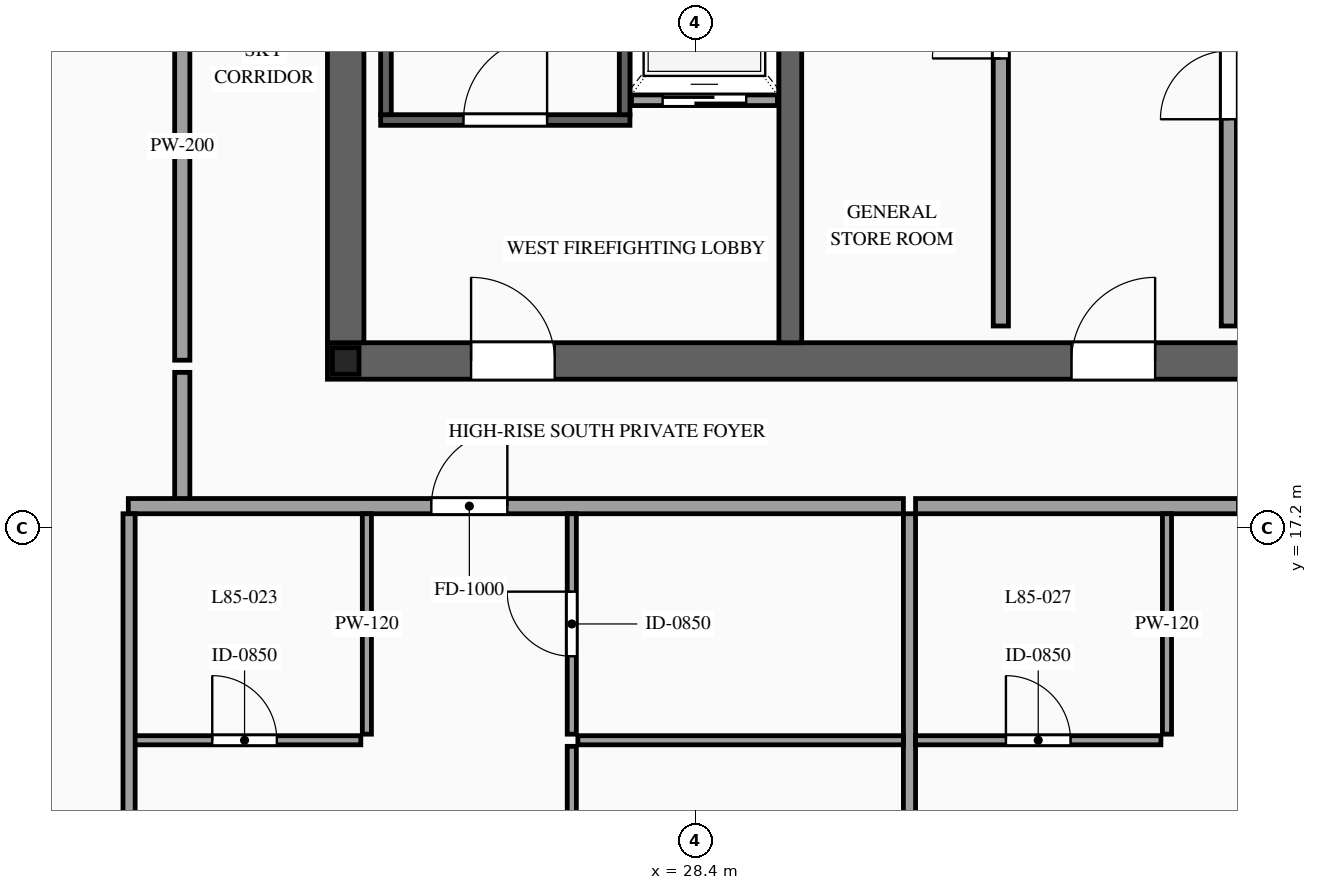
"""IFC4 building model, lengths in metres.
Left out: names, types, materials, properties, quantities, classifications, styles, units other than length and angle.
Written with IfcOpenShell. Run it as: python <this file> out.ifc"""

import sys

from ifc_helpers import new_model, si_unit, direction, frame, frame_2d, origin, origin_2d, place, context, subcontext, project, spatial, rectangle, i_section, extrude, source, transform, mapped, element, fill, save


model = new_model("IFC4")
c1 = context("Model", 3, precision=1e-05, world=origin(), true_north=direction((0.0, 1.0)))
c2 = subcontext(c1, "Body", "Model", "MODEL_VIEW")
j1 = project(units=[si_unit("LENGTHUNIT", "METRE"), si_unit("PLANEANGLEUNIT", "RADIAN")], contexts=[c1])
p1 = place(None, origin())
s1 = spatial("IfcSite", under=j1, at=p1, CompositionType="ELEMENT")
p2 = place(p1, origin())
s2 = spatial("IfcBuilding", under=s1, at=p2, CompositionType="ELEMENT")
p3 = place(p2, frame((0.0, 0.0, 318.2)))
s3 = spatial("IfcBuildingStorey", under=s2, at=p3, CompositionType="ELEMENT", Elevation=318.2)
p4 = place(p3, frame((23.56, 19.4, 0.0), z_axis=(0.0, 0.0, 1.0), x_axis=(1.0, 0.0, 0.0)))
e1 = element("IfcWall", 1, at=p4, inside=s3, PredefinedType="SHEAR", context=c2, shape_type="SweptSolid", body=[
    extrude(rectangle(XDim=26.88, YDim=0.48, at=frame_2d((13.44, 0.0))), origin(), (0.0, 0.0, 1.0), 3.5),
])
p5 = place(p4, frame((1.89, 0.0, 0.0)))
e2 = element("IfcOpeningElement", 2, at=p5, cuts=e1, PredefinedType="OPENING", context=c2, shape_type="SweptSolid", body=[
    extrude(rectangle(XDim=1.1, YDim=2.2, at=frame_2d((0.55, 1.1))), frame((0.0, 0.255, 0.0), z_axis=(0.0, -1.0, 0.0), x_axis=(1.0, 0.0, 0.0)), (0.0, 0.0, 1.0), 0.51),
])
p6 = place(p4, frame((9.79, 0.0, 0.0)))
e3 = element("IfcOpeningElement", 3, at=p6, cuts=e1, PredefinedType="OPENING", context=c2, shape_type="SweptSolid", body=[
    extrude(rectangle(XDim=1.1, YDim=2.2, at=frame_2d((0.55, 1.1))), frame((0.0, 0.255, 0.0), z_axis=(0.0, -1.0, 0.0), x_axis=(1.0, 0.0, 0.0)), (0.0, 0.0, 1.0), 0.51),
])
p7 = place(p4, frame((22.99, 0.0, 0.0)))
e4 = element("IfcOpeningElement", 4, at=p7, cuts=e1, PredefinedType="OPENING", context=c2, shape_type="SweptSolid", body=[
    extrude(rectangle(XDim=1.1, YDim=2.2, at=frame_2d((0.55, 1.1))), frame((0.0, 0.255, 0.0), z_axis=(0.0, -1.0, 0.0), x_axis=(1.0, 0.0, 0.0)), (0.0, 0.0, 1.0), 0.51),
])
p8 = place(p4, frame((19.61, 0.0, 0.0)))
e5 = element("IfcOpeningElement", 5, at=p8, cuts=e1, PredefinedType="OPENING", context=c2, shape_type="SweptSolid", body=[
    extrude(rectangle(XDim=0.9, YDim=2.15, at=frame_2d((0.45, 1.075))), frame((0.0, 0.255, 0.0), z_axis=(0.0, -1.0, 0.0), x_axis=(1.0, 0.0, 0.0)), (0.0, 0.0, 1.0), 0.51),
])
p9 = place(p4, frame((18.17, 0.0, 0.0)))
e6 = element("IfcOpeningElement", 6, at=p9, cuts=e1, PredefinedType="OPENING", context=c2, shape_type="SweptSolid", body=[
    extrude(rectangle(XDim=0.9, YDim=2.15, at=frame_2d((0.45, 1.075))), frame((0.0, 0.255, 0.0), z_axis=(0.0, -1.0, 0.0), x_axis=(1.0, 0.0, 0.0)), (0.0, 0.0, 1.0), 0.51),
])
m1 = source(origin(), c2, "Body", "SweptSolid", [
    extrude(rectangle(XDim=12.32, YDim=0.48, at=frame_2d((6.16, 0.0))), origin(), (0.0, 0.0, 1.0), 3.5),
])
p10 = place(p3, frame((23.8, 19.64, 0.0), z_axis=(0.0, 0.0, 1.0), x_axis=(0.0, 1.0, 0.0)))
e7 = element("IfcWall", 7, at=p10, inside=s3, PredefinedType="SHEAR", context=c2, shape_type="MappedRepresentation", body=[
    mapped(m1, transform((0.0, 0.0, 0.0), scale=1.0)),
])
m2 = source(origin(), c2, "Body", "SweptSolid", [
    extrude(rectangle(XDim=12.32, YDim=0.3, at=frame_2d((6.16, 0.0))), origin(), (0.0, 0.0, 1.0), 3.5),
])
p11 = place(p3, frame((29.65, 19.64, 0.0), z_axis=(0.0, 0.0, 1.0), x_axis=(0.0, 1.0, 0.0)))
e8 = element("IfcWall", 8, at=p11, inside=s3, PredefinedType="SOLIDWALL", context=c2, shape_type="MappedRepresentation", body=[
    mapped(m2, transform((0.0, 0.0, 0.0), scale=1.0)),
])
m3 = source(origin(), c2, "Body", "SweptSolid", [
    extrude(i_section(OverallWidth=0.35, OverallDepth=0.35, WebThickness=0.012, FlangeThickness=0.019, at=origin_2d()), origin(), (0.0, 0.0, 1.0), 3.5),
])
p12 = place(p3, frame((23.8, 19.4, 0.0), z_axis=(0.0, 0.0, 1.0), x_axis=(1.0, 0.0, 0.0)))
e9 = element("IfcColumn", 9, at=p12, inside=s3, PredefinedType="COLUMN", context=c2, shape_type="MappedRepresentation", body=[
    mapped(m3, transform((0.0, 0.0, 0.0), scale=1.0)),
])
p13 = place(p3, frame((27.56, 22.83, 0.0), z_axis=(0.0, 0.0, 1.0), x_axis=(1.0, 0.0, 0.0)))
e10 = element("IfcWall", 10, at=p13, inside=s3, PredefinedType="SOLIDWALL", context=c2, shape_type="SweptSolid", body=[
    extrude(rectangle(XDim=1.92, YDim=0.14, at=frame_2d((0.96, 0.0))), origin(), (0.0, 0.0, 1.0), 3.28),
])
p14 = place(p13, frame((0.41, 0.0, 0.0)))
e11 = element("IfcOpeningElement", 11, at=p14, cuts=e10, PredefinedType="OPENING", context=c2, shape_type="SweptSolid", body=[
    extrude(rectangle(XDim=1.1, YDim=2.2, at=frame_2d((0.55, 1.1))), frame((0.0, 0.085, 0.0), z_axis=(0.0, -1.0, 0.0), x_axis=(1.0, 0.0, 0.0)), (0.0, 0.0, 1.0), 0.17),
])
p15 = place(p3, frame((24.26, 22.57, 0.0), z_axis=(0.0, 0.0, 1.0), x_axis=(1.0, 0.0, 0.0)))
e12 = element("IfcWall", 12, at=p15, inside=s3, PredefinedType="SOLIDWALL", context=c2, shape_type="SweptSolid", body=[
    extrude(rectangle(XDim=3.28, YDim=0.14, at=frame_2d((1.64, 0.0))), origin(), (0.0, 0.0, 1.0), 3.28),
])
p16 = place(p15, frame((1.09, 0.0, 0.0)))
e13 = element("IfcOpeningElement", 13, at=p16, cuts=e12, PredefinedType="OPENING", context=c2, shape_type="SweptSolid", body=[
    extrude(rectangle(XDim=1.1, YDim=2.2, at=frame_2d((0.55, 1.1))), frame((0.0, 0.085, 0.0), z_axis=(0.0, -1.0, 0.0), x_axis=(1.0, 0.0, 0.0)), (0.0, 0.0, 1.0), 0.17),
])
m4 = source(origin(), c2, "Body", "SweptSolid", [
    extrude(rectangle(XDim=8.94, YDim=0.14, at=frame_2d((4.47, 0.0))), origin(), (0.0, 0.0, 1.0), 3.28),
])
for number, where, z_axis, x_axis in (
    (14, (24.33, 22.64, 0.0), (0.0, 0.0, 1.0), (0.0, 1.0, 0.0)),
    (15, (27.47, 22.64, 0.0), (0.0, 0.0, 1.0), (0.0, 1.0, 0.0)),
):
    element("IfcWall", number, at=place(p3, frame(where, z_axis=z_axis, x_axis=x_axis)), inside=s3, PredefinedType="SOLIDWALL", context=c2, shape_type="MappedRepresentation", body=[
        mapped(m4, transform((0.0, 0.0, 0.0), scale=1.0)),
    ])
p17 = place(p3, frame((32.42, 19.86, 0.0), z_axis=(0.0, 0.0, 1.0), x_axis=(0.0, 1.0, 0.0)))
e16 = element("IfcWall", 16, at=p17, inside=s3, PredefinedType="PARTITIONING", context=c2, shape_type="SweptSolid", body=[
    extrude(rectangle(XDim=7.94, YDim=0.2, at=frame_2d((3.97, 0.0))), origin(), (0.0, 0.0, 1.0), 3.28),
])
p18 = place(p17, frame((3.52, 0.0, 0.0)))
e17 = element("IfcOpeningElement", 17, at=p18, cuts=e16, PredefinedType="OPENING", context=c2, shape_type="SweptSolid", body=[
    extrude(rectangle(XDim=0.9, YDim=2.15, at=frame_2d((0.45, 1.075))), frame((0.0, 0.115, 0.0), z_axis=(0.0, -1.0, 0.0), x_axis=(1.0, 0.0, 0.0)), (0.0, 0.0, 1.0), 0.23),
])
p19 = place(p3, frame((35.42, 19.86, 0.0), z_axis=(0.0, 0.0, 1.0), x_axis=(0.0, 1.0, 0.0)))
e18 = element("IfcWall", 18, at=p19, inside=s3, PredefinedType="PARTITIONING", context=c2, shape_type="SweptSolid", body=[
    extrude(rectangle(XDim=6.34, YDim=0.2, at=frame_2d((3.17, 0.0))), origin(), (0.0, 0.0, 1.0), 3.28),
])
p20 = place(p19, frame((2.72, 0.0, 0.0)))
e19 = element("IfcOpeningElement", 19, at=p20, cuts=e18, PredefinedType="OPENING", context=c2, shape_type="SweptSolid", body=[
    extrude(rectangle(XDim=0.9, YDim=2.15, at=frame_2d((0.45, 1.075))), frame((0.0, 0.115, 0.0), z_axis=(0.0, -1.0, 0.0), x_axis=(1.0, 0.0, 0.0)), (0.0, 0.0, 1.0), 0.23),
])
m5 = source(origin(), c2, "Body", "SweptSolid", [
    extrude(rectangle(XDim=1.7, YDim=0.2, at=frame_2d((0.85, 0.0))), origin(), (0.0, 0.0, 1.0), 3.28),
])
p21 = place(p3, frame((21.65, 17.55, 0.0), z_axis=(0.0, 0.0, 1.0), x_axis=(0.0, 1.0, 0.0)))
e20 = element("IfcWall", 20, at=p21, inside=s3, PredefinedType="PARTITIONING", context=c2, shape_type="MappedRepresentation", body=[
    mapped(m5, transform((0.0, 0.0, 0.0), scale=1.0)),
])
p22 = place(p3, frame((20.94, 17.49, 0.0), z_axis=(0.0, 0.0, 1.0), x_axis=(1.0, 0.0, 0.0)))
e21 = element("IfcWall", 21, at=p22, inside=s3, PredefinedType="PARTITIONING", context=c2, shape_type="SweptSolid", body=[
    extrude(rectangle(XDim=10.198, YDim=0.2, at=frame_2d((5.099, 0.0))), origin(), (0.0, 0.0, 1.0), 3.28),
])
p23 = place(p22, frame((3.987, 0.0, 0.0)))
e22 = element("IfcOpeningElement", 22, at=p23, cuts=e21, PredefinedType="OPENING", context=c2, shape_type="SweptSolid", body=[
    extrude(rectangle(XDim=1.0, YDim=2.2, at=frame_2d((0.5, 1.1))), frame((0.0, 0.115, 0.0), z_axis=(0.0, -1.0, 0.0), x_axis=(1.0, 0.0, 0.0)), (0.0, 0.0, 1.0), 0.23),
])
m6 = source(origin(), c2, "Body", "SweptSolid", [
    extrude(rectangle(XDim=10.54, YDim=0.16, at=frame_2d((5.27, 0.0))), origin(), (0.0, 0.0, 1.0), 3.28),
])
p24 = place(p3, frame((31.218, 6.85, 0.0), z_axis=(0.0, 0.0, 1.0), x_axis=(0.0, 1.0, 0.0)))
e23 = element("IfcWall", 23, at=p24, inside=s3, PredefinedType="PARTITIONING", context=c2, shape_type="MappedRepresentation", body=[
    mapped(m6, transform((0.0, 0.0, 0.0), scale=1.0)),
])
p25 = place(p3, frame((20.94, 14.41, 0.0), z_axis=(0.0, 0.0, 1.0), x_axis=(1.0, 0.0, 0.0)))
e24 = element("IfcWall", 24, at=p25, inside=s3, PredefinedType="PARTITIONING", context=c2, shape_type="SweptSolid", body=[
    extrude(rectangle(XDim=3.059, YDim=0.12, at=frame_2d((1.53, 0.0))), origin(), (0.0, 0.0, 1.0), 3.28),
])
p26 = place(p25, frame((1.104, 0.0, 0.0)))
e25 = element("IfcOpeningElement", 25, at=p26, cuts=e24, PredefinedType="OPENING", context=c2, shape_type="SweptSolid", body=[
    extrude(rectangle(XDim=0.85, YDim=2.1, at=frame_2d((0.425, 1.05))), frame((0.0, 0.075, 0.0), z_axis=(0.0, -1.0, 0.0), x_axis=(1.0, 0.0, 0.0)), (0.0, 0.0, 1.0), 0.15),
])
m7 = source(origin(), c2, "Body", "SweptSolid", [
    extrude(rectangle(XDim=2.9, YDim=0.12, at=frame_2d((1.45, 0.0))), origin(), (0.0, 0.0, 1.0), 3.28),
])
p27 = place(p3, frame((24.079, 14.49, 0.0), z_axis=(0.0, 0.0, 1.0), x_axis=(0.0, 1.0, 0.0)))
e26 = element("IfcWall", 26, at=p27, inside=s3, PredefinedType="PARTITIONING", context=c2, shape_type="MappedRepresentation", body=[
    mapped(m7, transform((0.0, 0.0, 0.0), scale=1.0)),
])
m8 = source(origin(), c2, "Body", "SweptSolid", [
    extrude(rectangle(XDim=4.283, YDim=0.12, at=frame_2d((2.142, 0.0))), origin(), (0.0, 0.0, 1.0), 3.28),
])
p28 = place(p3, frame((26.855, 14.41, 0.0), z_axis=(0.0, 0.0, 1.0), x_axis=(1.0, 0.0, 0.0)))
e27 = element("IfcWall", 27, at=p28, inside=s3, PredefinedType="PARTITIONING", context=c2, shape_type="MappedRepresentation", body=[
    mapped(m8, transform((0.0, 0.0, 0.0), scale=1.0)),
])
p29 = place(p3, frame((26.775, 14.49, 0.0), z_axis=(0.0, 0.0, 1.0), x_axis=(0.0, 1.0, 0.0)))
e28 = element("IfcWall", 28, at=p29, inside=s3, PredefinedType="PARTITIONING", context=c2, shape_type="SweptSolid", body=[
    extrude(rectangle(XDim=2.9, YDim=0.12, at=frame_2d((1.45, 0.0))), origin(), (0.0, 0.0, 1.0), 3.28),
])
p30 = place(p29, frame((1.025, 0.0, 0.0)))
e29 = element("IfcOpeningElement", 29, at=p30, cuts=e28, PredefinedType="OPENING", context=c2, shape_type="SweptSolid", body=[
    extrude(rectangle(XDim=0.85, YDim=2.1, at=frame_2d((0.425, 1.05))), frame((0.0, 0.075, 0.0), z_axis=(0.0, -1.0, 0.0), x_axis=(1.0, 0.0, 0.0)), (0.0, 0.0, 1.0), 0.15),
])
p31 = place(p3, frame((26.775, 6.85, 0.0), z_axis=(0.0, 0.0, 1.0), x_axis=(0.0, 1.0, 0.0)))
e30 = element("IfcWall", 30, at=p31, inside=s3, PredefinedType="PARTITIONING", context=c2, shape_type="SweptSolid", body=[
    extrude(rectangle(XDim=7.48, YDim=0.12, at=frame_2d((3.74, 0.0))), origin(), (0.0, 0.0, 1.0), 3.28),
])
p32 = place(p31, frame((3.29, 0.0, 0.0)))
e31 = element("IfcOpeningElement", 31, at=p32, cuts=e30, PredefinedType="OPENING", context=c2, shape_type="SweptSolid", body=[
    extrude(rectangle(XDim=0.9, YDim=2.15, at=frame_2d((0.45, 1.075))), frame((0.0, 0.075, 0.0), z_axis=(0.0, -1.0, 0.0), x_axis=(1.0, 0.0, 0.0)), (0.0, 0.0, 1.0), 0.15),
])
p33 = place(p3, frame((31.298, 17.49, 0.0), z_axis=(0.0, 0.0, 1.0), x_axis=(1.0, 0.0, 0.0)))
e32 = element("IfcWall", 32, at=p33, inside=s3, PredefinedType="PARTITIONING", context=c2, shape_type="SweptSolid", body=[
    extrude(rectangle(XDim=10.761, YDim=0.2, at=frame_2d((5.38, 0.0))), origin(), (0.0, 0.0, 1.0), 3.28),
])
p34 = place(p33, frame((4.234, 0.0, 0.0)))
e33 = element("IfcOpeningElement", 33, at=p34, cuts=e32, PredefinedType="OPENING", context=c2, shape_type="SweptSolid", body=[
    extrude(rectangle(XDim=1.0, YDim=2.2, at=frame_2d((0.5, 1.1))), frame((0.0, 0.115, 0.0), z_axis=(0.0, -1.0, 0.0), x_axis=(1.0, 0.0, 0.0)), (0.0, 0.0, 1.0), 0.23),
])
p35 = place(p3, frame((31.298, 14.41, 0.0), z_axis=(0.0, 0.0, 1.0), x_axis=(1.0, 0.0, 0.0)))
e34 = element("IfcWall", 34, at=p35, inside=s3, PredefinedType="PARTITIONING", context=c2, shape_type="SweptSolid", body=[
    extrude(rectangle(XDim=3.228, YDim=0.12, at=frame_2d((1.614, 0.0))), origin(), (0.0, 0.0, 1.0), 3.28),
])
p36 = place(p35, frame((1.189, 0.0, 0.0)))
e35 = element("IfcOpeningElement", 35, at=p36, cuts=e34, PredefinedType="OPENING", context=c2, shape_type="SweptSolid", body=[
    extrude(rectangle(XDim=0.85, YDim=2.1, at=frame_2d((0.425, 1.05))), frame((0.0, 0.075, 0.0), z_axis=(0.0, -1.0, 0.0), x_axis=(1.0, 0.0, 0.0)), (0.0, 0.0, 1.0), 0.15),
])
p37 = place(p3, frame((34.606, 14.49, 0.0), z_axis=(0.0, 0.0, 1.0), x_axis=(0.0, 1.0, 0.0)))
e36 = element("IfcWall", 36, at=p37, inside=s3, PredefinedType="PARTITIONING", context=c2, shape_type="MappedRepresentation", body=[
    mapped(m7, transform((0.0, 0.0, 0.0), scale=1.0)),
])
m9 = source(origin(), c2, "Body", "SweptSolid", [
    extrude(rectangle(XDim=10.39, YDim=0.16, at=frame_2d((5.195, 0.0))), origin(), (0.0, 0.0, 1.0), 3.28),
])
p38 = place(p3, frame((20.95, 7.0, 0.0), z_axis=(0.0, 0.0, 1.0), x_axis=(0.0, 1.0, 0.0)))
e37 = element("IfcWall", 37, at=p38, inside=s3, PredefinedType="PARTITIONING", context=c2, shape_type="MappedRepresentation", body=[
    mapped(m9, transform((0.0, 0.0, 0.0), scale=1.0)),
])
p39 = place(p3, frame((21.65, 19.41, 0.0), z_axis=(0.0, 0.0, 1.0), x_axis=(0.0, 1.0, 0.0)))
e38 = element("IfcWall", 38, at=p39, inside=s3, PredefinedType="PARTITIONING", context=c2, shape_type="SweptSolid", body=[
    extrude(rectangle(XDim=12.78, YDim=0.2, at=frame_2d((6.39, 0.0))), origin(), (0.0, 0.0, 1.0), 3.28),
])
p40 = place(p39, frame((5.89, 0.0, 0.0)))
e39 = element("IfcOpeningElement", 39, at=p40, cuts=e38, PredefinedType="OPENING", context=c2, shape_type="SweptSolid", body=[
    extrude(rectangle(XDim=1.0, YDim=2.2, at=frame_2d((0.5, 1.1))), frame((0.0, 0.115, 0.0), z_axis=(0.0, -1.0, 0.0), x_axis=(1.0, 0.0, 0.0)), (0.0, 0.0, 1.0), 0.23),
])
m10 = source(origin(), c2, "Body", "SweptSolid", [
    extrude(rectangle(XDim=1.1, YDim=2.2, at=frame_2d((0.55, 1.1))), frame((0.0, 0.025, 0.0), z_axis=(0.0, -1.0, 0.0), x_axis=(1.0, 0.0, 0.0)), (0.0, 0.0, 1.0), 0.05),
])
p41 = place(p14, origin())
e40 = element("IfcDoor", 40, at=p41, inside=s3, OperationType="SLIDING_TO_LEFT", PredefinedType="DOOR", context=c2, shape_type="MappedRepresentation", body=[
    mapped(m10, transform((0.0, 0.0, 0.0), scale=1.0)),
])
fill(e11, e40)
m11 = source(origin(), c2, "Body", "SweptSolid", [
    extrude(rectangle(XDim=1.1, YDim=2.2, at=frame_2d((0.55, 1.1))), frame((0.0, 0.025, 0.0), z_axis=(0.0, -1.0, 0.0), x_axis=(1.0, 0.0, 0.0)), (0.0, 0.0, 1.0), 0.05),
])
p42 = place(p16, origin())
e41 = element("IfcDoor", 41, at=p42, inside=s3, OperationType="SINGLE_SWING_RIGHT", PredefinedType="DOOR", context=c2, shape_type="MappedRepresentation", body=[
    mapped(m11, transform((0.0, 0.0, 0.0), scale=1.0)),
])
fill(e13, e41)
p43 = place(p5, origin())
e42 = element("IfcDoor", 42, at=p43, inside=s3, OperationType="SINGLE_SWING_LEFT", PredefinedType="DOOR", context=c2, shape_type="MappedRepresentation", body=[
    mapped(m11, transform((0.0, 0.0, 0.0), scale=1.0)),
])
fill(e2, e42)
p44 = place(p6, origin())
e43 = element("IfcDoor", 43, at=p44, inside=s3, OperationType="SINGLE_SWING_RIGHT", PredefinedType="DOOR", context=c2, shape_type="MappedRepresentation", body=[
    mapped(m11, transform((0.0, 0.0, 0.0), scale=1.0)),
])
fill(e3, e43)
m12 = source(origin(), c2, "Body", "SweptSolid", [
    extrude(rectangle(XDim=0.9, YDim=2.15, at=frame_2d((0.45, 1.075))), frame((0.0, 0.025, 0.0), z_axis=(0.0, -1.0, 0.0), x_axis=(1.0, 0.0, 0.0)), (0.0, 0.0, 1.0), 0.05),
])
p45 = place(p18, origin())
e44 = element("IfcDoor", 44, at=p45, inside=s3, OperationType="SINGLE_SWING_LEFT", PredefinedType="DOOR", context=c2, shape_type="MappedRepresentation", body=[
    mapped(m12, transform((0.0, 0.0, 0.0), scale=1.0)),
])
fill(e17, e44)
p46 = place(p20, origin())
e45 = element("IfcDoor", 45, at=p46, inside=s3, OperationType="SINGLE_SWING_LEFT", PredefinedType="DOOR", context=c2, shape_type="MappedRepresentation", body=[
    mapped(m12, transform((0.0, 0.0, 0.0), scale=1.0)),
])
fill(e19, e45)
m13 = source(origin(), c2, "Body", "SweptSolid", [
    extrude(rectangle(XDim=1.0, YDim=2.2, at=frame_2d((0.5, 1.1))), frame((0.0, 0.025, 0.0), z_axis=(0.0, -1.0, 0.0), x_axis=(1.0, 0.0, 0.0)), (0.0, 0.0, 1.0), 0.05),
])
p47 = place(p23, origin())
e46 = element("IfcDoor", 46, at=p47, inside=s3, OperationType="SINGLE_SWING_RIGHT", PredefinedType="DOOR", context=c2, shape_type="MappedRepresentation", body=[
    mapped(m13, transform((0.0, 0.0, 0.0), scale=1.0)),
])
fill(e22, e46)
m14 = source(origin(), c2, "Body", "SweptSolid", [
    extrude(rectangle(XDim=0.85, YDim=2.1, at=frame_2d((0.425, 1.05))), frame((0.0, 0.025, 0.0), z_axis=(0.0, -1.0, 0.0), x_axis=(1.0, 0.0, 0.0)), (0.0, 0.0, 1.0), 0.05),
])
p48 = place(p26, origin())
e47 = element("IfcDoor", 47, at=p48, inside=s3, OperationType="SINGLE_SWING_LEFT", PredefinedType="DOOR", context=c2, shape_type="MappedRepresentation", body=[
    mapped(m14, transform((0.0, 0.0, 0.0), scale=1.0)),
])
fill(e25, e47)
p49 = place(p30, origin())
e48 = element("IfcDoor", 48, at=p49, inside=s3, OperationType="SINGLE_SWING_RIGHT", PredefinedType="DOOR", context=c2, shape_type="MappedRepresentation", body=[
    mapped(m14, transform((0.0, 0.0, 0.0), scale=1.0)),
])
fill(e29, e48)
p50 = place(p36, origin())
e49 = element("IfcDoor", 49, at=p50, inside=s3, OperationType="SINGLE_SWING_LEFT", PredefinedType="DOOR", context=c2, shape_type="MappedRepresentation", body=[
    mapped(m14, transform((0.0, 0.0, 0.0), scale=1.0)),
])
fill(e35, e49)
save(model, sys.argv[1])
